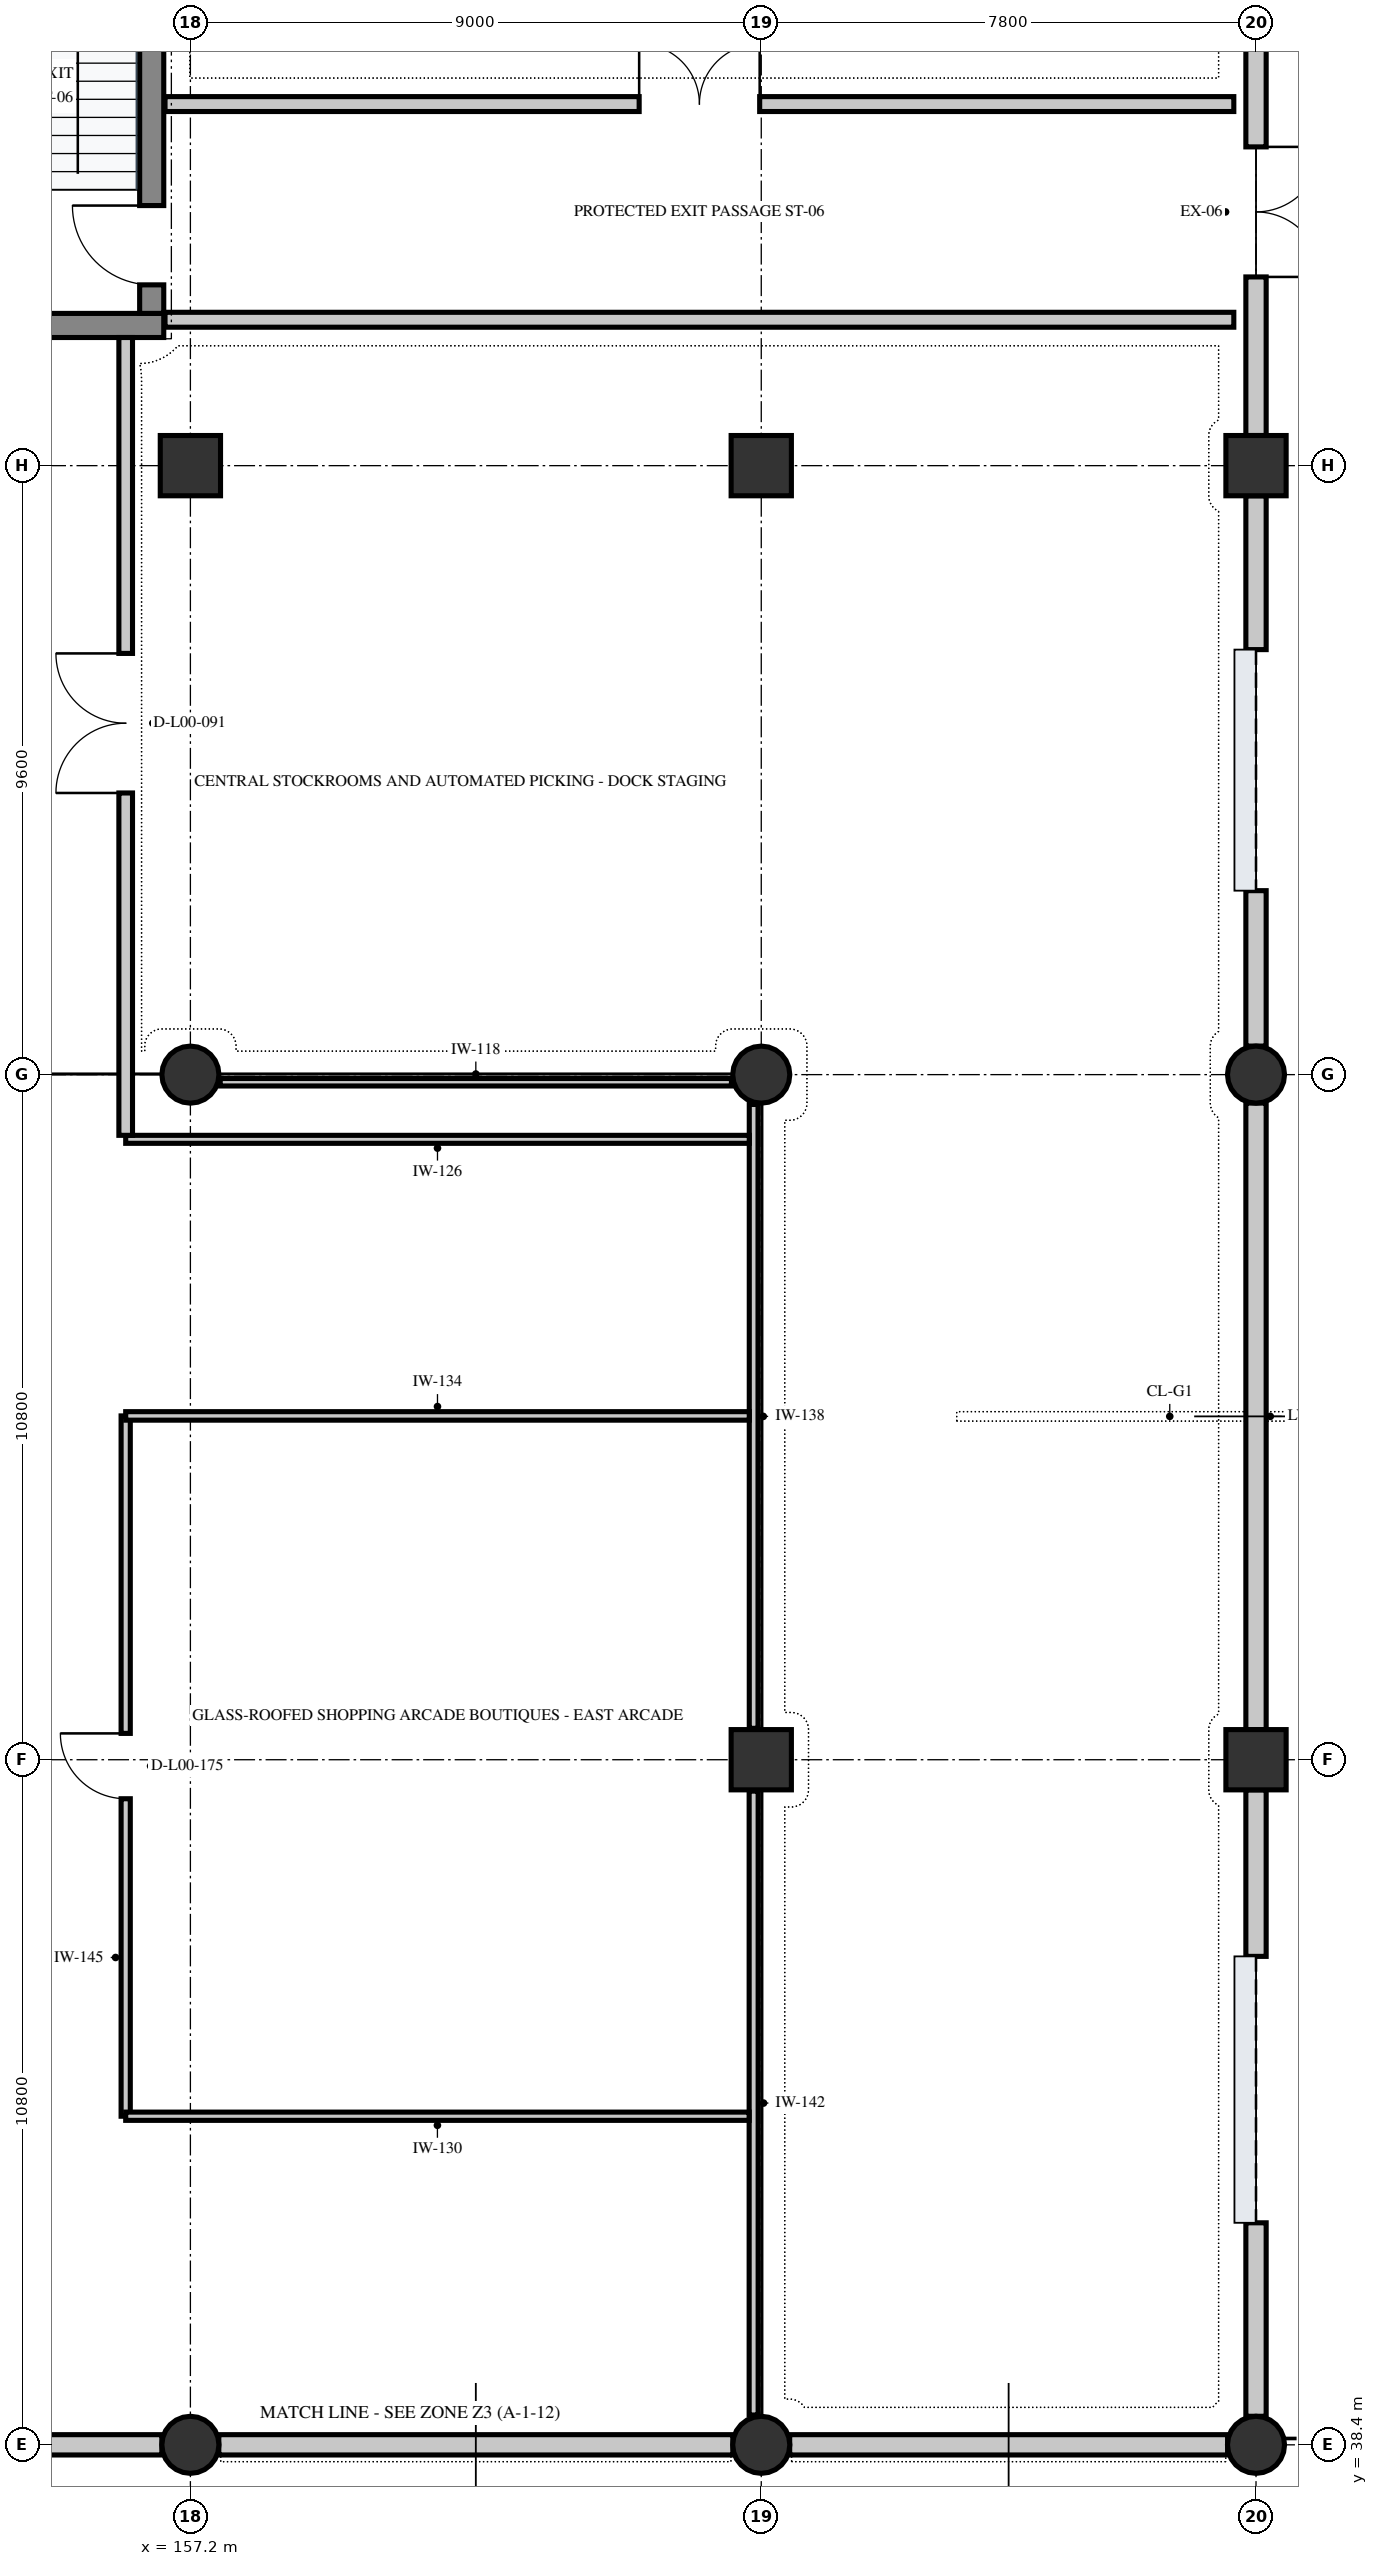
"""IFC4 building model, lengths in metres.
Left out: names, types, materials, properties, quantities, classifications, styles, units other than length and angle.
Written with IfcOpenShell. Run it as: python <this file> out.ifc"""

import sys

from ifc_helpers import new_model, si_unit, direction, frame, frame_2d, origin, origin_2d, place, context, subcontext, project, spatial, rectangle, circle, extrude, element, fill, save


model = new_model("IFC4")
c1 = context("Model", 3, precision=1e-05, world=origin(), true_north=direction((0.0, 1.0)))
c2 = subcontext(c1, "Body", "Model", "MODEL_VIEW")
j1 = project(units=[si_unit("LENGTHUNIT", "METRE"), si_unit("PLANEANGLEUNIT", "RADIAN")], contexts=[c1])
p1 = place(None, origin())
s1 = spatial("IfcSite", under=j1, at=p1, CompositionType="ELEMENT")
p2 = place(p1, origin())
s2 = spatial("IfcBuilding", under=s1, at=p2, CompositionType="ELEMENT")
p3 = place(p2, origin())
s3 = spatial("IfcBuildingStorey", under=s2, at=p3, CompositionType="ELEMENT", Elevation=0.0)
for number, where, z_axis, x_axis in (
    (1, (157.2, 38.4, 0.0), (0.0, 0.0, 1.0), (1.0, 0.0, 0.0)),
    (2, (157.2, 60.0, 0.0), (0.0, 0.0, 1.0), (1.0, 0.0, 0.0)),
):
    element("IfcColumn", number, at=place(p3, frame(where, z_axis=z_axis, x_axis=x_axis)), inside=s3, PredefinedType="COLUMN", context=c2, shape_type="SweptSolid", body=[
        extrude(circle(Radius=0.45, at=origin_2d()), origin(), (0.0, 0.0, 1.0), 5.4),
    ])
p4 = place(p3, frame((157.2, 69.6, 0.0), z_axis=(0.0, 0.0, 1.0), x_axis=(1.0, 0.0, 0.0)))
e3 = element("IfcColumn", 3, at=p4, inside=s3, PredefinedType="COLUMN", context=c2, shape_type="SweptSolid", body=[
    extrude(rectangle(XDim=0.95, YDim=0.95, at=origin_2d()), origin(), (0.0, 0.0, 1.0), 5.4),
])
p5 = place(p3, frame((166.2, 38.4, 0.0), z_axis=(0.0, 0.0, 1.0), x_axis=(1.0, 0.0, 0.0)))
e4 = element("IfcColumn", 4, at=p5, inside=s3, PredefinedType="COLUMN", context=c2, shape_type="SweptSolid", body=[
    extrude(circle(Radius=0.45, at=origin_2d()), origin(), (0.0, 0.0, 1.0), 5.4),
])
p6 = place(p3, frame((166.2, 49.2, 0.0), z_axis=(0.0, 0.0, 1.0), x_axis=(1.0, 0.0, 0.0)))
e5 = element("IfcColumn", 5, at=p6, inside=s3, PredefinedType="COLUMN", context=c2, shape_type="SweptSolid", body=[
    extrude(rectangle(XDim=0.95, YDim=0.95, at=origin_2d()), origin(), (0.0, 0.0, 1.0), 5.4),
])
p7 = place(p3, frame((166.2, 60.0, 0.0), z_axis=(0.0, 0.0, 1.0), x_axis=(1.0, 0.0, 0.0)))
e6 = element("IfcColumn", 6, at=p7, inside=s3, PredefinedType="COLUMN", context=c2, shape_type="SweptSolid", body=[
    extrude(circle(Radius=0.45, at=origin_2d()), origin(), (0.0, 0.0, 1.0), 5.4),
])
p8 = place(p3, frame((166.2, 69.6, 0.0), z_axis=(0.0, 0.0, 1.0), x_axis=(1.0, 0.0, 0.0)))
e7 = element("IfcColumn", 7, at=p8, inside=s3, PredefinedType="COLUMN", context=c2, shape_type="SweptSolid", body=[
    extrude(rectangle(XDim=0.95, YDim=0.95, at=origin_2d()), origin(), (0.0, 0.0, 1.0), 5.4),
])
p9 = place(p3, frame((174.0, 38.4, -0.3), z_axis=(0.0, 0.0, 1.0), x_axis=(1.0, 0.0, 0.0)))
e8 = element("IfcColumn", 8, at=p9, inside=s3, PredefinedType="COLUMN", context=c2, shape_type="SweptSolid", body=[
    extrude(circle(Radius=0.45, at=origin_2d()), origin(), (0.0, 0.0, 1.0), 5.7),
])
p10 = place(p3, frame((174.0, 49.2, -0.3), z_axis=(0.0, 0.0, 1.0), x_axis=(1.0, 0.0, 0.0)))
e9 = element("IfcColumn", 9, at=p10, inside=s3, PredefinedType="COLUMN", context=c2, shape_type="SweptSolid", body=[
    extrude(rectangle(XDim=0.95, YDim=0.95, at=origin_2d()), origin(), (0.0, 0.0, 1.0), 5.7),
])
p11 = place(p3, frame((174.0, 60.0, -0.3), z_axis=(0.0, 0.0, 1.0), x_axis=(1.0, 0.0, 0.0)))
e10 = element("IfcColumn", 10, at=p11, inside=s3, PredefinedType="COLUMN", context=c2, shape_type="SweptSolid", body=[
    extrude(circle(Radius=0.45, at=origin_2d()), origin(), (0.0, 0.0, 1.0), 5.7),
])
p12 = place(p3, frame((174.0, 69.6, -0.3), z_axis=(0.0, 0.0, 1.0), x_axis=(1.0, 0.0, 0.0)))
e11 = element("IfcColumn", 11, at=p12, inside=s3, PredefinedType="COLUMN", context=c2, shape_type="SweptSolid", body=[
    extrude(rectangle(XDim=0.95, YDim=0.95, at=origin_2d()), origin(), (0.0, 0.0, 1.0), 5.7),
])
p13 = place(p3, frame((174.0, 78.725, 0.0), z_axis=(0.0, 0.0, 1.0), x_axis=(0.0, -1.0, 0.0)))
e12 = element("IfcWall", 12, at=p13, inside=s3, PredefinedType="SOLIDWALL", context=c2, shape_type="SweptSolid", body=[
    extrude(rectangle(XDim=8.65, YDim=0.32, at=frame_2d((4.325, 0.0))), origin(), (0.0, 0.0, 1.0), 5.09),
])
p14 = place(p13, frame((4.1, 0.0, 0.0)))
e13 = element("IfcOpeningElement", 13, at=p14, cuts=e12, PredefinedType="OPENING", context=c2, shape_type="SweptSolid", body=[
    extrude(rectangle(XDim=2.05, YDim=2.25, at=frame_2d((1.025, 1.125))), frame((0.0, 0.172, 0.0), z_axis=(0.0, -1.0, 0.0), x_axis=(1.0, 0.0, 0.0)), (0.0, 0.0, 1.0), 0.344),
])
p15 = place(p3, frame((174.0, 69.125, 0.0), z_axis=(0.0, 0.0, 1.0), x_axis=(0.0, -1.0, 0.0)))
e14 = element("IfcWall", 14, at=p15, inside=s3, PredefinedType="SOLIDWALL", context=c2, shape_type="SweptSolid", body=[
    extrude(rectangle(XDim=8.675, YDim=0.32, at=frame_2d((4.337, 0.0))), origin(), (0.0, 0.0, 1.0), 5.09),
])
p16 = place(p15, frame((2.425, 0.0, 0.0)))
e15 = element("IfcOpeningElement", 15, at=p16, cuts=e14, PredefinedType="OPENING", context=c2, shape_type="SweptSolid", body=[
    extrude(rectangle(XDim=3.8, YDim=3.7, at=frame_2d((1.9, 1.85))), frame((0.0, 0.172, 0.0), z_axis=(0.0, -1.0, 0.0), x_axis=(1.0, 0.0, 0.0)), (0.0, 0.0, 1.0), 0.344),
])
p17 = place(p3, frame((174.0, 59.552, 0.0), z_axis=(0.0, 0.0, 1.0), x_axis=(0.0, -1.0, 0.0)))
e16 = element("IfcWall", 16, at=p17, inside=s3, PredefinedType="SOLIDWALL", context=c2, shape_type="SweptSolid", body=[
    extrude(rectangle(XDim=9.879, YDim=0.32, at=frame_2d((4.939, 0.0))), origin(), (0.0, 0.0, 1.0), 5.09),
])
p18 = place(p3, frame((174.0, 48.725, 0.0), z_axis=(0.0, 0.0, 1.0), x_axis=(0.0, -1.0, 0.0)))
e17 = element("IfcWall", 17, at=p18, inside=s3, PredefinedType="SOLIDWALL", context=c2, shape_type="SweptSolid", body=[
    extrude(rectangle(XDim=9.875, YDim=0.32, at=frame_2d((4.938, 0.0))), origin(), (0.0, 0.0, 1.0), 5.09),
])
p19 = place(p18, frame((2.625, 0.0, 0.0)))
e18 = element("IfcOpeningElement", 18, at=p19, cuts=e17, PredefinedType="OPENING", context=c2, shape_type="SweptSolid", body=[
    extrude(rectangle(XDim=4.2, YDim=3.8, at=frame_2d((2.1, 1.9))), frame((0.0, 0.172, 0.0), z_axis=(0.0, -1.0, 0.0), x_axis=(1.0, 0.0, 0.0)), (0.0, 0.0, 1.0), 0.344),
])
p20 = place(p3, frame((173.552, 38.4, 0.0), z_axis=(0.0, 0.0, 1.0), x_axis=(-1.0, 0.0, 0.0)))
e19 = element("IfcWall", 19, at=p20, inside=s3, PredefinedType="SOLIDWALL", context=c2, shape_type="SweptSolid", body=[
    extrude(rectangle(XDim=6.904, YDim=0.32, at=frame_2d((3.452, 0.0))), origin(), (0.0, 0.0, 1.0), 5.09),
])
p21 = place(p3, frame((165.752, 38.4, 0.0), z_axis=(0.0, 0.0, 1.0), x_axis=(-1.0, 0.0, 0.0)))
e20 = element("IfcWall", 20, at=p21, inside=s3, PredefinedType="SOLIDWALL", context=c2, shape_type="SweptSolid", body=[
    extrude(rectangle(XDim=8.104, YDim=0.32, at=frame_2d((4.052, 0.0))), origin(), (0.0, 0.0, 1.0), 4.03),
])
p22 = place(p3, frame((156.75, 38.4, 0.0), z_axis=(0.0, 0.0, 1.0), x_axis=(-1.0, 0.0, 0.0)))
e21 = element("IfcWall", 21, at=p22, inside=s3, PredefinedType="SOLIDWALL", context=c2, shape_type="SweptSolid", body=[
    extrude(rectangle(XDim=8.1, YDim=0.32, at=frame_2d((4.05, 0.0))), origin(), (0.0, 0.0, 1.0), 4.03),
])
p23 = place(p22, frame((2.85, 0.0, 0.0)))
e22 = element("IfcOpeningElement", 22, at=p23, cuts=e21, PredefinedType="OPENING", context=c2, shape_type="SweptSolid", body=[
    extrude(rectangle(XDim=2.4, YDim=2.8, at=frame_2d((1.2, 1.4))), frame((0.0, 0.172, 0.0), z_axis=(0.0, -1.0, 0.0), x_axis=(1.0, 0.0, 0.0)), (0.0, 0.0, 1.0), 0.344),
])
p24 = place(p3, frame((151.92, 71.81, 0.0), z_axis=(0.0, 0.0, 1.0), x_axis=(1.0, 0.0, 0.0)))
e23 = element("IfcWall", 23, at=p24, inside=s3, PredefinedType="SHEAR", context=c2, shape_type="SweptSolid", body=[
    extrude(rectangle(XDim=4.86, YDim=0.38, at=frame_2d((2.43, 0.0))), origin(), (0.0, 0.0, 1.0), 5.09),
])
p25 = place(p3, frame((156.59, 72.0, 0.0), z_axis=(0.0, 0.0, 1.0), x_axis=(0.0, 1.0, 0.0)))
e24 = element("IfcWall", 24, at=p25, inside=s3, PredefinedType="SHEAR", context=c2, shape_type="SweptSolid", body=[
    extrude(rectangle(XDim=8.8, YDim=0.38, at=frame_2d((4.4, 0.0))), origin(), (0.0, 0.0, 1.0), 5.09),
])
p26 = place(p25, frame((0.45, 0.0, 0.0)))
e25 = element("IfcOpeningElement", 25, at=p26, cuts=e24, PredefinedType="OPENING", context=c2, shape_type="SweptSolid", body=[
    extrude(rectangle(XDim=1.25, YDim=2.2, at=frame_2d((0.625, 1.1))), frame((0.0, 0.202, 0.0), z_axis=(0.0, -1.0, 0.0), x_axis=(1.0, 0.0, 0.0)), (0.0, 0.0, 1.0), 0.404),
])
p27 = place(p3, frame((156.8, 71.9, 0.0), z_axis=(0.0, 0.0, 1.0), x_axis=(1.0, 0.0, 0.0)))
e26 = element("IfcWall", 26, at=p27, inside=s3, PredefinedType="PARTITIONING", context=c2, shape_type="SweptSolid", body=[
    extrude(rectangle(XDim=16.85, YDim=0.235, at=frame_2d((8.425, 0.0))), origin(), (0.0, 0.0, 1.0), 4.03),
])
p28 = place(p3, frame((156.8, 75.3, 0.0), z_axis=(0.0, 0.0, 1.0), x_axis=(1.0, 0.0, 0.0)))
e27 = element("IfcWall", 27, at=p28, inside=s3, PredefinedType="PARTITIONING", context=c2, shape_type="SweptSolid", body=[
    extrude(rectangle(XDim=16.85, YDim=0.235, at=frame_2d((8.425, 0.0))), origin(), (0.0, 0.0, 1.0), 4.03),
])
p29 = place(p28, frame((7.475, 0.0, 0.0)))
e28 = element("IfcOpeningElement", 28, at=p29, cuts=e27, PredefinedType="OPENING", context=c2, shape_type="SweptSolid", body=[
    extrude(rectangle(XDim=1.9, YDim=2.25, at=frame_2d((0.95, 1.125))), frame((0.0, 0.129, 0.0), z_axis=(0.0, -1.0, 0.0), x_axis=(1.0, 0.0, 0.0)), (0.0, 0.0, 1.0), 0.259),
])
p30 = place(p3, frame((156.18, 43.58, 0.0), z_axis=(0.0, 0.0, 1.0), x_axis=(0.0, 1.0, 0.0)))
e29 = element("IfcWall", 29, at=p30, inside=s3, PredefinedType="PARTITIONING", context=c2, shape_type="SweptSolid", body=[
    extrude(rectangle(XDim=11.04, YDim=0.145, at=frame_2d((5.52, 0.0))), origin(), (0.0, 0.0, 1.0), 5.09),
])
p31 = place(p30, frame((5.005, 0.0, 0.0)))
e30 = element("IfcOpeningElement", 30, at=p31, cuts=e29, PredefinedType="OPENING", context=c2, shape_type="SweptSolid", body=[
    extrude(rectangle(XDim=1.03, YDim=2.16, at=frame_2d((0.515, 1.08))), frame((0.0, 0.084, 0.0), z_axis=(0.0, -1.0, 0.0), x_axis=(1.0, 0.0, 0.0)), (0.0, 0.0, 1.0), 0.169),
])
p32 = place(p3, frame((166.08, 48.705, 0.0), z_axis=(0.0, 0.0, 1.0), x_axis=(0.0, -1.0, 0.0)))
e31 = element("IfcWall", 31, at=p32, inside=s3, PredefinedType="PARTITIONING", context=c2, shape_type="SweptSolid", body=[
    extrude(rectangle(XDim=9.835, YDim=0.142, at=frame_2d((4.917, 0.0))), origin(), (0.0, 0.0, 1.0), 4.03),
])
p33 = place(p3, frame((166.08, 59.53, 0.0), z_axis=(0.0, 0.0, 1.0), x_axis=(0.0, -1.0, 0.0)))
e32 = element("IfcWall", 32, at=p33, inside=s3, PredefinedType="PARTITIONING", context=c2, shape_type="SweptSolid", body=[
    extrude(rectangle(XDim=9.835, YDim=0.138, at=frame_2d((4.917, 0.0))), origin(), (0.0, 0.0, 1.0), 4.03),
])
p34 = place(p3, frame((156.18, 54.62, 0.0), z_axis=(0.0, 0.0, 1.0), x_axis=(1.0, 0.0, 0.0)))
e33 = element("IfcWall", 33, at=p34, inside=s3, PredefinedType="PARTITIONING", context=c2, shape_type="SweptSolid", body=[
    extrude(rectangle(XDim=9.831, YDim=0.134, at=frame_2d((4.916, 0.0))), origin(), (0.0, 0.0, 1.0), 5.09),
])
p35 = place(p3, frame((166.009, 43.58, 0.0), z_axis=(0.0, 0.0, 1.0), x_axis=(-1.0, 0.0, 0.0)))
e34 = element("IfcWall", 34, at=p35, inside=s3, PredefinedType="PARTITIONING", context=c2, shape_type="SweptSolid", body=[
    extrude(rectangle(XDim=9.829, YDim=0.13, at=frame_2d((4.915, 0.0))), origin(), (0.0, 0.0, 1.0), 5.09),
])
p36 = place(p3, frame((166.011, 58.98, 0.0), z_axis=(0.0, 0.0, 1.0), x_axis=(-1.0, 0.0, 0.0)))
e35 = element("IfcWall", 35, at=p36, inside=s3, PredefinedType="PARTITIONING", context=c2, shape_type="SweptSolid", body=[
    extrude(rectangle(XDim=9.831, YDim=0.126, at=frame_2d((4.916, 0.0))), origin(), (0.0, 0.0, 1.0), 5.09),
])
p37 = place(p3, frame((157.67, 59.88, 0.0), z_axis=(0.0, 0.0, 1.0), x_axis=(1.0, 0.0, 0.0)))
e36 = element("IfcWall", 36, at=p37, inside=s3, PredefinedType="PARTITIONING", context=c2, shape_type="SweptSolid", body=[
    extrude(rectangle(XDim=8.06, YDim=0.118, at=frame_2d((4.03, 0.0))), origin(), (0.0, 0.0, 1.0), 4.03),
])
p38 = place(p3, frame((156.18, 59.043, 0.0), z_axis=(0.0, 0.0, 1.0), x_axis=(0.0, 1.0, 0.0)))
e37 = element("IfcWall", 37, at=p38, inside=s3, PredefinedType="PARTITIONING", context=c2, shape_type="SweptSolid", body=[
    extrude(rectangle(XDim=12.577, YDim=0.215, at=frame_2d((6.289, 0.0))), origin(), (0.0, 0.0, 1.0), 4.03),
])
p39 = place(p38, frame((5.397, 0.0, 0.0)))
e38 = element("IfcOpeningElement", 38, at=p39, cuts=e37, PredefinedType="OPENING", context=c2, shape_type="SweptSolid", body=[
    extrude(rectangle(XDim=2.2, YDim=2.5, at=frame_2d((1.1, 1.25))), frame((0.0, 0.12, 0.0), z_axis=(0.0, -1.0, 0.0), x_axis=(1.0, 0.0, 0.0)), (0.0, 0.0, 1.0), 0.239),
])
p40 = place(p14, origin())
e39 = element("IfcDoor", 39, at=p40, inside=s3, OperationType="DOUBLE_DOOR_SINGLE_SWING", PredefinedType="DOOR", context=c2, shape_type="SweptSolid", body=[
    extrude(rectangle(XDim=2.05, YDim=2.25, at=frame_2d((1.025, 1.125))), frame((0.0, 0.025, 0.0), z_axis=(0.0, -1.0, 0.0), x_axis=(1.0, 0.0, 0.0)), (0.0, 0.0, 1.0), 0.05),
])
fill(e13, e39)
p41 = place(p16, origin())
e40 = element("IfcDoor", 40, at=p41, inside=s3, OperationType="ROLLINGUP", PredefinedType="DOOR", context=c2, shape_type="SweptSolid", body=[
    extrude(rectangle(XDim=3.8, YDim=3.7, at=frame_2d((1.9, 1.85))), frame((0.0, 0.025, 0.0), z_axis=(0.0, -1.0, 0.0), x_axis=(1.0, 0.0, 0.0)), (0.0, 0.0, 1.0), 0.05),
])
fill(e15, e40)
p42 = place(p19, origin())
e41 = element("IfcDoor", 41, at=p42, inside=s3, OperationType="ROLLINGUP", PredefinedType="DOOR", context=c2, shape_type="SweptSolid", body=[
    extrude(rectangle(XDim=4.2, YDim=3.8, at=frame_2d((2.1, 1.9))), frame((0.0, 0.025, 0.0), z_axis=(0.0, -1.0, 0.0), x_axis=(1.0, 0.0, 0.0)), (0.0, 0.0, 1.0), 0.05),
])
fill(e18, e41)
p43 = place(p26, origin())
e42 = element("IfcDoor", 42, at=p43, inside=s3, OperationType="SINGLE_SWING_RIGHT", PredefinedType="DOOR", context=c2, shape_type="SweptSolid", body=[
    extrude(rectangle(XDim=1.25, YDim=2.2, at=frame_2d((0.625, 1.1))), frame((0.0, 0.025, 0.0), z_axis=(0.0, -1.0, 0.0), x_axis=(1.0, 0.0, 0.0)), (0.0, 0.0, 1.0), 0.05),
])
fill(e25, e42)
p44 = place(p29, origin())
e43 = element("IfcDoor", 43, at=p44, inside=s3, OperationType="DOUBLE_DOOR_SINGLE_SWING", PredefinedType="DOOR", context=c2, shape_type="SweptSolid", body=[
    extrude(rectangle(XDim=1.9, YDim=2.25, at=frame_2d((0.95, 1.125))), frame((0.0, 0.025, 0.0), z_axis=(0.0, -1.0, 0.0), x_axis=(1.0, 0.0, 0.0)), (0.0, 0.0, 1.0), 0.05),
])
fill(e28, e43)
p45 = place(p39, origin())
e44 = element("IfcDoor", 44, at=p45, inside=s3, OperationType="DOUBLE_DOOR_SINGLE_SWING", PredefinedType="DOOR", context=c2, shape_type="SweptSolid", body=[
    extrude(rectangle(XDim=2.2, YDim=2.5, at=frame_2d((1.1, 1.25))), frame((0.0, 0.025, 0.0), z_axis=(0.0, -1.0, 0.0), x_axis=(1.0, 0.0, 0.0)), (0.0, 0.0, 1.0), 0.05),
])
fill(e38, e44)
p46 = place(p31, origin())
e45 = element("IfcDoor", 45, at=p46, inside=s3, OperationType="SINGLE_SWING_RIGHT", PredefinedType="DOOR", context=c2, shape_type="SweptSolid", body=[
    extrude(rectangle(XDim=1.03, YDim=2.16, at=frame_2d((0.515, 1.08))), frame((0.0, 0.025, 0.0), z_axis=(0.0, -1.0, 0.0), x_axis=(1.0, 0.0, 0.0)), (0.0, 0.0, 1.0), 0.05),
])
fill(e30, e45)
save(model, sys.argv[1])
